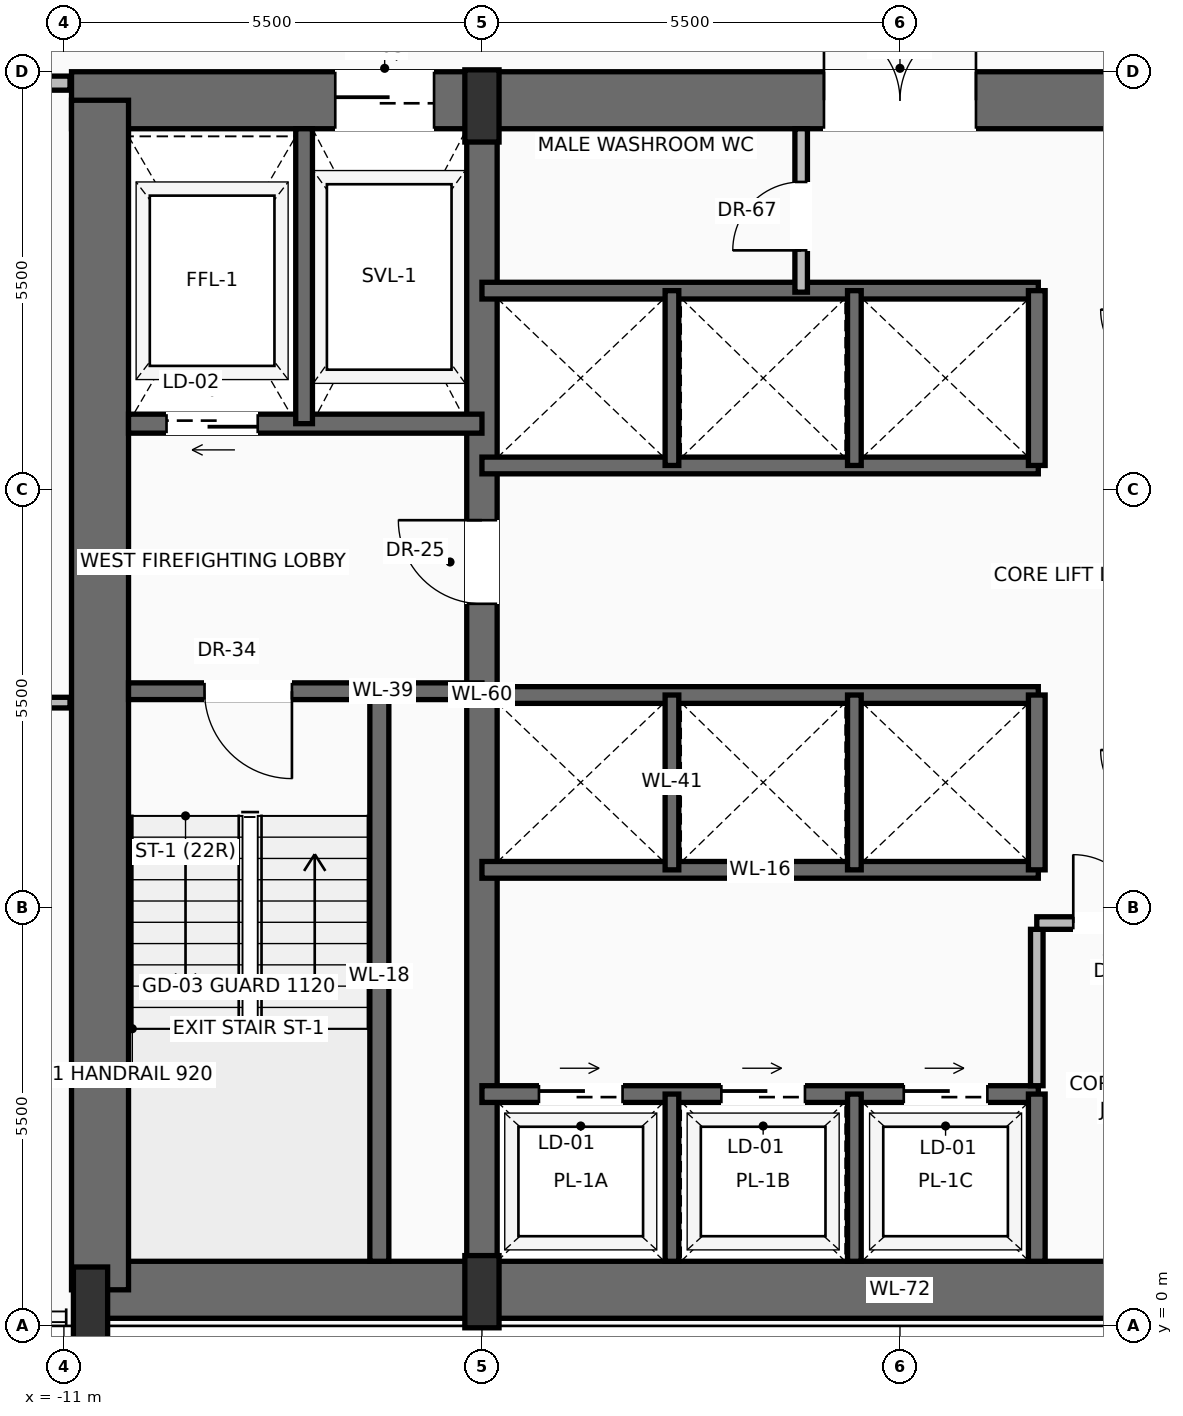
"""IFC4 building model, lengths in metres.
Left out: names, types, materials, properties, quantities, classifications, styles, units other than length and angle.
Written with IfcOpenShell. Run it as: python <this file> out.ifc"""

import sys

from ifc_helpers import new_model, si_unit, direction, frame, frame_2d, origin, origin_2d, place, context, subcontext, project, spatial, rectangle, extrude, source, transform, mapped, element, fill, save


model = new_model("IFC4")
c1 = context("Model", 3, precision=1e-05, world=origin(), true_north=direction((0.0, 1.0)))
c2 = subcontext(c1, "Body", "Model", "MODEL_VIEW")
j1 = project(units=[si_unit("LENGTHUNIT", "METRE"), si_unit("PLANEANGLEUNIT", "RADIAN")], contexts=[c1])
p1 = place(None, origin())
s1 = spatial("IfcSite", under=j1, at=p1, CompositionType="ELEMENT")
p2 = place(p1, origin())
s2 = spatial("IfcBuilding", under=s1, at=p2, CompositionType="ELEMENT")
p3 = place(p2, frame((0.0, 0.0, 98.8)))
s3 = spatial("IfcBuildingStorey", under=s2, at=p3, CompositionType="ELEMENT", Elevation=98.8)
p4 = place(p3, frame((-10.65, 0.475, 0.0), z_axis=(0.0, 0.0, 1.0), x_axis=(1.0, 0.0, 0.0)))
e1 = element("IfcWall", 1, at=p4, inside=s3, PredefinedType="SHEAR", context=c2, shape_type="SweptSolid", body=[
    extrude(rectangle(XDim=21.3, YDim=0.75, at=frame_2d((10.65, 0.0))), origin(), (0.0, 0.0, 1.0), 3.45),
])
p5 = place(p3, frame((-10.9, 16.125, 0.0), z_axis=(0.0, 0.0, 1.0), x_axis=(1.0, 0.0, 0.0)))
e2 = element("IfcWall", 2, at=p5, inside=s3, PredefinedType="SHEAR", context=c2, shape_type="SweptSolid", body=[
    extrude(rectangle(XDim=21.8, YDim=0.75, at=frame_2d((10.9, 0.0))), origin(), (0.0, 0.0, 1.0), 3.45),
])
p6 = place(p5, frame((3.47, 0.0, 0.0)))
e3 = element("IfcOpeningElement", 3, at=p6, cuts=e2, PredefinedType="OPENING", context=c2, shape_type="SweptSolid", body=[
    extrude(rectangle(XDim=1.3, YDim=2.3, at=frame_2d((0.65, 1.15))), frame((0.0, 0.385, 0.0), z_axis=(0.0, -1.0, 0.0), x_axis=(1.0, 0.0, 0.0)), (0.0, 0.0, 1.0), 0.77),
])
p7 = place(p5, frame((9.9, 0.0, 0.0)))
e4 = element("IfcOpeningElement", 4, at=p7, cuts=e2, PredefinedType="OPENING", context=c2, shape_type="SweptSolid", body=[
    extrude(rectangle(XDim=2.0, YDim=2.4, at=frame_2d((1.0, 1.2))), frame((0.0, 0.385, 0.0), z_axis=(0.0, -1.0, 0.0), x_axis=(1.0, 0.0, 0.0)), (0.0, 0.0, 1.0), 0.77),
])
p8 = place(p3, frame((-10.525, 0.475, 0.0), z_axis=(0.0, 0.0, 1.0), x_axis=(0.0, 1.0, 0.0)))
e5 = element("IfcWall", 5, at=p8, inside=s3, PredefinedType="SHEAR", context=c2, shape_type="SweptSolid", body=[
    extrude(rectangle(XDim=15.65, YDim=0.75, at=frame_2d((7.825, 0.0))), origin(), (0.0, 0.0, 1.0), 3.45),
])
p9 = place(p3, frame((-5.5, 0.475, 0.0), z_axis=(0.0, 0.0, 1.0), x_axis=(0.0, 1.0, 0.0)))
e6 = element("IfcWall", 6, at=p9, inside=s3, PredefinedType="SHEAR", context=c2, shape_type="SweptSolid", body=[
    extrude(rectangle(XDim=15.65, YDim=0.4, at=frame_2d((7.825, 0.0))), origin(), (0.0, 0.0, 1.0), 3.45),
])
p10 = place(p9, frame((9.025, 0.0, 0.0)))
e7 = element("IfcOpeningElement", 7, at=p10, cuts=e6, PredefinedType="OPENING", context=c2, shape_type="SweptSolid", body=[
    extrude(rectangle(XDim=1.1, YDim=2.2, at=frame_2d((0.55, 1.1))), frame((0.0, 0.21, 0.0), z_axis=(0.0, -1.0, 0.0), x_axis=(1.0, 0.0, 0.0)), (0.0, 0.0, 1.0), 0.42),
])
m1 = source(origin(), c2, "Body", "SweptSolid", [
    extrude(rectangle(XDim=0.45, YDim=0.95, at=origin_2d()), origin(), (0.0, 0.0, 1.0), 3.7),
])
for number, where, z_axis, x_axis in (
    (8, (-10.65, 0.3, 0.0), (0.0, 0.0, 1.0), (1.0, 0.0, 0.0)),
    (9, (-5.5, 0.45, 0.0), (0.0, 0.0, 1.0), (1.0, 0.0, 0.0)),
    (10, (-5.5, 16.05, 0.0), (0.0, 0.0, 1.0), (1.0, 0.0, 0.0)),
):
    element("IfcColumn", number, at=place(p3, frame(where, z_axis=z_axis, x_axis=x_axis)), inside=s3, PredefinedType="PILASTER", context=c2, shape_type="MappedRepresentation", body=[
        mapped(m1, transform((0.0, 0.0, 0.0), scale=1.0)),
    ])
p11 = place(p3, frame((-6.85, 0.85, 0.0), z_axis=(0.0, 0.0, 1.0), x_axis=(0.0, 1.0, 0.0)))
e11 = element("IfcWall", 11, at=p11, inside=s3, PredefinedType="SOLIDWALL", context=c2, shape_type="SweptSolid", body=[
    extrude(rectangle(XDim=7.5, YDim=0.25, at=frame_2d((3.75, 0.0))), origin(), (0.0, 0.0, 1.0), 3.45),
])
p12 = place(p3, frame((-5.5, 8.35, 0.0), z_axis=(0.0, 0.0, 1.0), x_axis=(-1.0, 0.0, 0.0)))
e12 = element("IfcWall", 12, at=p12, inside=s3, PredefinedType="SOLIDWALL", context=c2, shape_type="SweptSolid", body=[
    extrude(rectangle(XDim=4.65, YDim=0.22, at=frame_2d((2.325, 0.0))), origin(), (0.0, 0.0, 1.0), 3.45),
])
p13 = place(p12, frame((2.5, 0.0, 0.0)))
e13 = element("IfcOpeningElement", 13, at=p13, cuts=e12, PredefinedType="OPENING", context=c2, shape_type="SweptSolid", body=[
    extrude(rectangle(XDim=1.15, YDim=2.2, at=frame_2d((0.575, 1.1))), frame((0.0, 0.12, 0.0), z_axis=(0.0, -1.0, 0.0), x_axis=(1.0, 0.0, 0.0)), (0.0, 0.0, 1.0), 0.24),
])
p14 = place(p3, frame((-5.5, 11.87, 0.0), z_axis=(0.0, 0.0, 1.0), x_axis=(-1.0, 0.0, 0.0)))
e14 = element("IfcWall", 14, at=p14, inside=s3, PredefinedType="SOLIDWALL", context=c2, shape_type="SweptSolid", body=[
    extrude(rectangle(XDim=4.65, YDim=0.25, at=frame_2d((2.325, 0.0))), origin(), (0.0, 0.0, 1.0), 3.45),
])
p15 = place(p14, frame((2.95, 0.0, 0.0)))
e15 = element("IfcOpeningElement", 15, at=p15, cuts=e14, PredefinedType="OPENING", context=c2, shape_type="SweptSolid", body=[
    extrude(rectangle(XDim=1.2, YDim=2.25, at=frame_2d((0.6, 1.125))), frame((0.0, 0.135, 0.0), z_axis=(0.0, -1.0, 0.0), x_axis=(1.0, 0.0, 0.0)), (0.0, 0.0, 1.0), 0.27),
])
p16 = place(p3, frame((-7.84, 11.87, 0.0), z_axis=(0.0, 0.0, 1.0), x_axis=(0.0, 1.0, 0.0)))
e16 = element("IfcWall", 16, at=p16, inside=s3, PredefinedType="SOLIDWALL", context=c2, shape_type="SweptSolid", body=[
    extrude(rectangle(XDim=3.88, YDim=0.22, at=frame_2d((1.94, 0.0))), origin(), (0.0, 0.0, 1.0), 3.45),
])
p17 = place(p3, frame((-5.5, 3.05, 0.0), z_axis=(0.0, 0.0, 1.0), x_axis=(1.0, 0.0, 0.0)))
e17 = element("IfcWall", 17, at=p17, inside=s3, PredefinedType="SOLIDWALL", context=c2, shape_type="SweptSolid", body=[
    extrude(rectangle(XDim=7.32, YDim=0.22, at=frame_2d((3.66, 0.0))), origin(), (0.0, 0.0, 1.0), 3.45),
])
p18 = place(p17, frame((0.75, 0.0, 0.0)))
e18 = element("IfcOpeningElement", 18, at=p18, cuts=e17, PredefinedType="OPENING", context=c2, shape_type="SweptSolid", body=[
    extrude(rectangle(XDim=1.1, YDim=2.2, at=frame_2d((0.55, 1.1))), frame((0.0, 0.12, 0.0), z_axis=(0.0, -1.0, 0.0), x_axis=(1.0, 0.0, 0.0)), (0.0, 0.0, 1.0), 0.24),
])
p19 = place(p17, frame((3.15, 0.0, 0.0)))
e19 = element("IfcOpeningElement", 19, at=p19, cuts=e17, PredefinedType="OPENING", context=c2, shape_type="SweptSolid", body=[
    extrude(rectangle(XDim=1.1, YDim=2.2, at=frame_2d((0.55, 1.1))), frame((0.0, 0.12, 0.0), z_axis=(0.0, -1.0, 0.0), x_axis=(1.0, 0.0, 0.0)), (0.0, 0.0, 1.0), 0.24),
])
p20 = place(p17, frame((5.55, 0.0, 0.0)))
e20 = element("IfcOpeningElement", 20, at=p20, cuts=e17, PredefinedType="OPENING", context=c2, shape_type="SweptSolid", body=[
    extrude(rectangle(XDim=1.1, YDim=2.2, at=frame_2d((0.55, 1.1))), frame((0.0, 0.12, 0.0), z_axis=(0.0, -1.0, 0.0), x_axis=(1.0, 0.0, 0.0)), (0.0, 0.0, 1.0), 0.24),
])
p21 = place(p3, frame((1.8, 0.85, 0.0), z_axis=(0.0, 0.0, 1.0), x_axis=(0.0, 1.0, 0.0)))
e21 = element("IfcWall", 21, at=p21, inside=s3, PredefinedType="SOLIDWALL", context=c2, shape_type="SweptSolid", body=[
    extrude(rectangle(XDim=2.2, YDim=0.22, at=frame_2d((1.1, 0.0))), origin(), (0.0, 0.0, 1.0), 3.45),
])
for number, where, z_axis, x_axis in (
    (22, (-3.0, 0.85, 0.0), (0.0, 0.0, 1.0), (0.0, 1.0, 0.0)),
    (23, (-0.6, 0.85, 0.0), (0.0, 0.0, 1.0), (0.0, 1.0, 0.0)),
):
    element("IfcWall", number, at=place(p3, frame(where, z_axis=z_axis, x_axis=x_axis)), inside=s3, PredefinedType="SOLIDWALL", context=c2, shape_type="SweptSolid", body=[
        extrude(rectangle(XDim=2.2, YDim=0.18, at=frame_2d((1.1, 0.0))), origin(), (0.0, 0.0, 1.0), 3.45),
    ])
p22 = place(p3, frame((1.8, 3.16, 0.0), z_axis=(0.0, 0.0, 1.0), x_axis=(0.0, 1.0, 0.0)))
e24 = element("IfcWall", 24, at=p22, inside=s3, PredefinedType="PARTITIONING", context=c2, shape_type="SweptSolid", body=[
    extrude(rectangle(XDim=2.058, YDim=0.165, at=frame_2d((1.029, 0.0))), origin(), (0.0, 0.0, 1.0), 3.442),
])
p23 = place(p3, frame((1.8, 5.3, 0.0), z_axis=(0.0, 0.0, 1.0), x_axis=(1.0, 0.0, 0.0)))
e25 = element("IfcWall", 25, at=p23, inside=s3, PredefinedType="PARTITIONING", context=c2, shape_type="SweptSolid", body=[
    extrude(rectangle(XDim=3.62, YDim=0.165, at=frame_2d((1.81, 0.0))), origin(), (0.0, 0.0, 1.0), 3.442),
])
p24 = place(p23, frame((0.48, 0.0, 0.0)))
e26 = element("IfcOpeningElement", 26, at=p24, cuts=e25, PredefinedType="OPENING", context=c2, shape_type="SweptSolid", body=[
    extrude(rectangle(XDim=0.9, YDim=2.1, at=frame_2d((0.45, 1.05))), frame((0.0, 0.093, 0.0), z_axis=(0.0, -1.0, 0.0), x_axis=(1.0, 0.0, 0.0)), (0.0, 0.0, 1.0), 0.185),
])
for number, where, z_axis, x_axis in (
    (27, (-5.5, 6.0, 0.0), (0.0, 0.0, 1.0), (1.0, 0.0, 0.0)),
    (28, (-5.5, 8.3, 0.0), (0.0, 0.0, 1.0), (1.0, 0.0, 0.0)),
):
    element("IfcWall", number, at=place(p3, frame(where, z_axis=z_axis, x_axis=x_axis)), inside=s3, PredefinedType="SOLIDWALL", context=c2, shape_type="SweptSolid", body=[
        extrude(rectangle(XDim=7.32, YDim=0.22, at=frame_2d((3.66, 0.0))), origin(), (0.0, 0.0, 1.0), 3.45),
    ])
p25 = place(p3, frame((1.8, 6.0, 0.0), z_axis=(0.0, 0.0, 1.0), x_axis=(0.0, 1.0, 0.0)))
e29 = element("IfcWall", 29, at=p25, inside=s3, PredefinedType="SOLIDWALL", context=c2, shape_type="SweptSolid", body=[
    extrude(rectangle(XDim=2.3, YDim=0.22, at=frame_2d((1.15, 0.0))), origin(), (0.0, 0.0, 1.0), 3.45),
])
for number, where, z_axis, x_axis in (
    (30, (-3.0, 6.0, 0.0), (0.0, 0.0, 1.0), (0.0, 1.0, 0.0)),
    (31, (-0.6, 6.0, 0.0), (0.0, 0.0, 1.0), (0.0, 1.0, 0.0)),
):
    element("IfcWall", number, at=place(p3, frame(where, z_axis=z_axis, x_axis=x_axis)), inside=s3, PredefinedType="SOLIDWALL", context=c2, shape_type="SweptSolid", body=[
        extrude(rectangle(XDim=2.3, YDim=0.18, at=frame_2d((1.15, 0.0))), origin(), (0.0, 0.0, 1.0), 3.45),
    ])
for number, where, z_axis, x_axis in (
    (32, (-5.5, 11.32, 0.0), (0.0, 0.0, 1.0), (1.0, 0.0, 0.0)),
    (33, (-5.5, 13.62, 0.0), (0.0, 0.0, 1.0), (1.0, 0.0, 0.0)),
):
    element("IfcWall", number, at=place(p3, frame(where, z_axis=z_axis, x_axis=x_axis)), inside=s3, PredefinedType="SOLIDWALL", context=c2, shape_type="SweptSolid", body=[
        extrude(rectangle(XDim=7.32, YDim=0.22, at=frame_2d((3.66, 0.0))), origin(), (0.0, 0.0, 1.0), 3.45),
    ])
p26 = place(p3, frame((1.8, 11.32, 0.0), z_axis=(0.0, 0.0, 1.0), x_axis=(0.0, 1.0, 0.0)))
e34 = element("IfcWall", 34, at=p26, inside=s3, PredefinedType="SOLIDWALL", context=c2, shape_type="SweptSolid", body=[
    extrude(rectangle(XDim=2.3, YDim=0.22, at=frame_2d((1.15, 0.0))), origin(), (0.0, 0.0, 1.0), 3.45),
])
for number, where, z_axis, x_axis in (
    (35, (-3.0, 11.32, 0.0), (0.0, 0.0, 1.0), (0.0, 1.0, 0.0)),
    (36, (-0.6, 11.32, 0.0), (0.0, 0.0, 1.0), (0.0, 1.0, 0.0)),
):
    element("IfcWall", number, at=place(p3, frame(where, z_axis=z_axis, x_axis=x_axis)), inside=s3, PredefinedType="SOLIDWALL", context=c2, shape_type="SweptSolid", body=[
        extrude(rectangle(XDim=2.3, YDim=0.18, at=frame_2d((1.15, 0.0))), origin(), (0.0, 0.0, 1.0), 3.45),
    ])
p27 = place(p3, frame((-1.3, 13.6, 0.0), z_axis=(0.0, 0.0, 1.0), x_axis=(0.0, 1.0, 0.0)))
e37 = element("IfcWall", 37, at=p27, inside=s3, PredefinedType="PARTITIONING", context=c2, shape_type="SweptSolid", body=[
    extrude(rectangle(XDim=2.15, YDim=0.165, at=frame_2d((1.075, 0.0))), origin(), (0.0, 0.0, 1.0), 3.442),
])
p28 = place(p27, frame((0.55, 0.0, 0.0)))
e38 = element("IfcOpeningElement", 38, at=p28, cuts=e37, PredefinedType="OPENING", context=c2, shape_type="SweptSolid", body=[
    extrude(rectangle(XDim=0.9, YDim=2.1, at=frame_2d((0.45, 1.05))), frame((0.0, 0.093, 0.0), z_axis=(0.0, -1.0, 0.0), x_axis=(1.0, 0.0, 0.0)), (0.0, 0.0, 1.0), 0.185),
])
p29 = place(p3, frame((-22.877, 16.35, 0.0), z_axis=(0.0, 0.0, 1.0), x_axis=(1.0, 0.0, 0.0)))
e39 = element("IfcWall", 39, at=p29, inside=s3, PredefinedType="PARTITIONING", context=c2, shape_type="SweptSolid", body=[
    extrude(rectangle(XDim=11.957, YDim=0.185, at=frame_2d((5.979, 0.0))), origin(), (0.0, 0.0, 1.0), 2.747),
])
p30 = place(p29, frame((4.94, 0.0, 0.0)))
e40 = element("IfcOpeningElement", 40, at=p30, cuts=e39, PredefinedType="OPENING", context=c2, shape_type="SweptSolid", body=[
    extrude(rectangle(XDim=0.95, YDim=2.2, at=frame_2d((0.475, 1.1))), frame((0.0, 0.103, 0.0), z_axis=(0.0, -1.0, 0.0), x_axis=(1.0, 0.0, 0.0)), (0.0, 0.0, 1.0), 0.205),
])
p31 = place(p3, frame((-27.501, 8.2, 0.0), z_axis=(0.0, 0.0, 1.0), x_axis=(1.0, 0.0, 0.0)))
e41 = element("IfcWall", 41, at=p31, inside=s3, PredefinedType="PARTITIONING", context=c2, shape_type="SweptSolid", body=[
    extrude(rectangle(XDim=16.581, YDim=0.14, at=frame_2d((8.291, 0.0))), origin(), (0.0, 0.0, 1.0), 3.442),
])
p32 = place(p31, frame((7.824, 0.0, 0.0)))
e42 = element("IfcOpeningElement", 42, at=p32, cuts=e41, PredefinedType="OPENING", context=c2, shape_type="SweptSolid", body=[
    extrude(rectangle(XDim=0.95, YDim=2.2, at=frame_2d((0.475, 1.1))), frame((0.0, 0.08, 0.0), z_axis=(0.0, -1.0, 0.0), x_axis=(1.0, 0.0, 0.0)), (0.0, 0.0, 1.0), 0.16),
])
m2 = source(origin(), c2, "Body", "SweptSolid", [
    extrude(rectangle(XDim=1.15, YDim=2.2, at=frame_2d((0.575, 1.1))), frame((0.0, 0.025, 0.0), z_axis=(0.0, -1.0, 0.0), x_axis=(1.0, 0.0, 0.0)), (0.0, 0.0, 1.0), 0.05),
])
p33 = place(p13, origin())
e43 = element("IfcDoor", 43, at=p33, inside=s3, OperationType="SINGLE_SWING_LEFT", PredefinedType="DOOR", context=c2, shape_type="MappedRepresentation", body=[
    mapped(m2, transform((0.0, 0.0, 0.0), scale=1.0)),
])
fill(e13, e43)
m3 = source(origin(), c2, "Body", "SweptSolid", [
    extrude(rectangle(XDim=1.1, YDim=2.2, at=frame_2d((0.55, 1.1))), frame((0.0, 0.025, 0.0), z_axis=(0.0, -1.0, 0.0), x_axis=(1.0, 0.0, 0.0)), (0.0, 0.0, 1.0), 0.05),
])
p34 = place(p10, origin())
e44 = element("IfcDoor", 44, at=p34, inside=s3, OperationType="SINGLE_SWING_RIGHT", PredefinedType="DOOR", context=c2, shape_type="MappedRepresentation", body=[
    mapped(m3, transform((0.0, 0.0, 0.0), scale=1.0)),
])
fill(e7, e44)
m4 = source(origin(), c2, "Body", "SweptSolid", [
    extrude(rectangle(XDim=1.2, YDim=2.25, at=frame_2d((0.6, 1.125))), frame((0.0, 0.025, 0.0), z_axis=(0.0, -1.0, 0.0), x_axis=(1.0, 0.0, 0.0)), (0.0, 0.0, 1.0), 0.05),
])
p35 = place(p15, origin())
e45 = element("IfcDoor", 45, at=p35, inside=s3, OperationType="SLIDING_TO_LEFT", PredefinedType="DOOR", context=c2, shape_type="MappedRepresentation", body=[
    mapped(m4, transform((0.0, 0.0, 0.0), scale=1.0)),
])
fill(e15, e45)
m5 = source(origin(), c2, "Body", "SweptSolid", [
    extrude(rectangle(XDim=1.3, YDim=2.3, at=frame_2d((0.65, 1.15))), frame((0.0, 0.025, 0.0), z_axis=(0.0, -1.0, 0.0), x_axis=(1.0, 0.0, 0.0)), (0.0, 0.0, 1.0), 0.05),
])
p36 = place(p6, origin())
e46 = element("IfcDoor", 46, at=p36, inside=s3, OperationType="SLIDING_TO_RIGHT", PredefinedType="DOOR", context=c2, shape_type="MappedRepresentation", body=[
    mapped(m5, transform((0.0, 0.0, 0.0), scale=1.0)),
])
fill(e3, e46)
m6 = source(origin(), c2, "Body", "SweptSolid", [
    extrude(rectangle(XDim=2.0, YDim=2.4, at=frame_2d((1.0, 1.2))), frame((0.0, 0.025, 0.0), z_axis=(0.0, -1.0, 0.0), x_axis=(1.0, 0.0, 0.0)), (0.0, 0.0, 1.0), 0.05),
])
p37 = place(p7, origin())
e47 = element("IfcDoor", 47, at=p37, inside=s3, OperationType="DOUBLE_DOOR_SINGLE_SWING", PredefinedType="DOOR", context=c2, shape_type="MappedRepresentation", body=[
    mapped(m6, transform((0.0, 0.0, 0.0), scale=1.0)),
])
fill(e4, e47)
m7 = source(origin(), c2, "Body", "SweptSolid", [
    extrude(rectangle(XDim=1.1, YDim=2.2, at=frame_2d((0.55, 1.1))), frame((0.0, 0.025, 0.0), z_axis=(0.0, -1.0, 0.0), x_axis=(1.0, 0.0, 0.0)), (0.0, 0.0, 1.0), 0.05),
])
p38 = place(p18, origin())
e48 = element("IfcDoor", 48, at=p38, inside=s3, OperationType="SLIDING_TO_RIGHT", PredefinedType="DOOR", context=c2, shape_type="MappedRepresentation", body=[
    mapped(m7, transform((0.0, 0.0, 0.0), scale=1.0)),
])
fill(e18, e48)
p39 = place(p19, origin())
e49 = element("IfcDoor", 49, at=p39, inside=s3, OperationType="SLIDING_TO_RIGHT", PredefinedType="DOOR", context=c2, shape_type="MappedRepresentation", body=[
    mapped(m7, transform((0.0, 0.0, 0.0), scale=1.0)),
])
fill(e19, e49)
p40 = place(p20, origin())
e50 = element("IfcDoor", 50, at=p40, inside=s3, OperationType="SLIDING_TO_RIGHT", PredefinedType="DOOR", context=c2, shape_type="MappedRepresentation", body=[
    mapped(m7, transform((0.0, 0.0, 0.0), scale=1.0)),
])
fill(e20, e50)
m8 = source(origin(), c2, "Body", "SweptSolid", [
    extrude(rectangle(XDim=0.9, YDim=2.1, at=frame_2d((0.45, 1.05))), frame((0.0, 0.025, 0.0), z_axis=(0.0, -1.0, 0.0), x_axis=(1.0, 0.0, 0.0)), (0.0, 0.0, 1.0), 0.05),
])
p41 = place(p24, origin())
e51 = element("IfcDoor", 51, at=p41, inside=s3, OperationType="SINGLE_SWING_LEFT", PredefinedType="DOOR", context=c2, shape_type="MappedRepresentation", body=[
    mapped(m8, transform((0.0, 0.0, 0.0), scale=1.0)),
])
fill(e26, e51)
p42 = place(p28, origin())
e52 = element("IfcDoor", 52, at=p42, inside=s3, OperationType="SINGLE_SWING_LEFT", PredefinedType="DOOR", context=c2, shape_type="MappedRepresentation", body=[
    mapped(m8, transform((0.0, 0.0, 0.0), scale=1.0)),
])
fill(e38, e52)
save(model, sys.argv[1])
